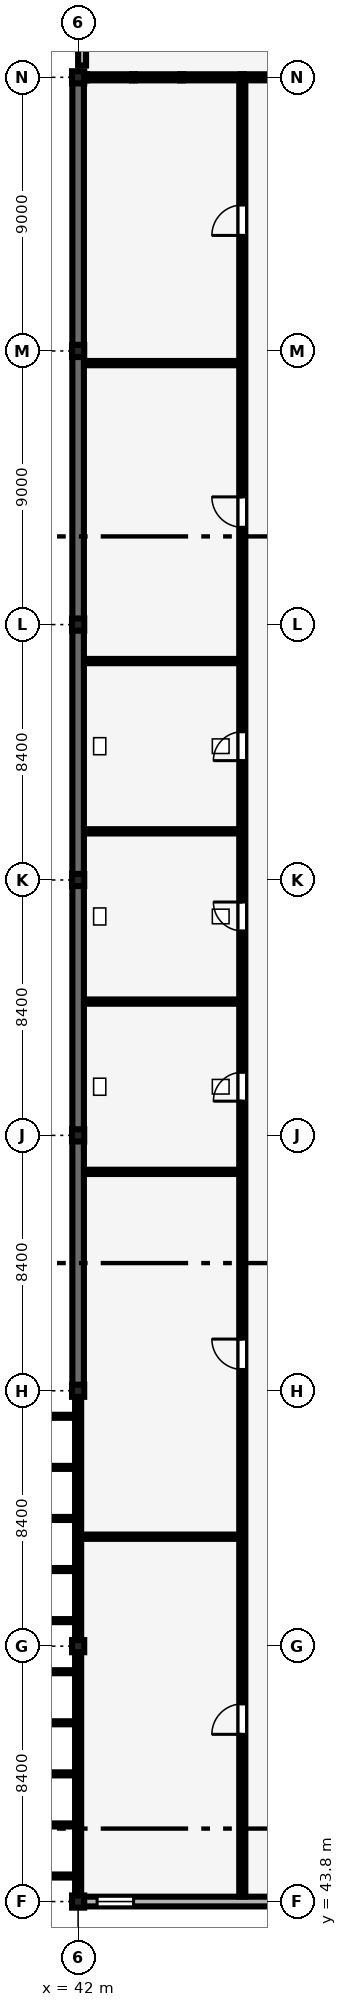
"""IFC4 building model, lengths in metres.
Left out: names, types, materials, properties, quantities, classifications, styles, units other than length and angle.
Written with IfcOpenShell. Run it as: python <this file> out.ifc"""

import sys

from ifc_helpers import new_model, si_unit, direction, frame, frame_2d, origin, origin_2d, place, context, subcontext, project, spatial, rectangle, extrude, element, fill, save


model = new_model("IFC4")
c1 = context("Model", 3, precision=1e-05, world=origin(), true_north=direction((0.0, 1.0)))
c2 = subcontext(c1, "Body", "Model", "MODEL_VIEW")
j1 = project(units=[si_unit("LENGTHUNIT", "METRE"), si_unit("PLANEANGLEUNIT", "RADIAN")], contexts=[c1])
p1 = place(None, origin())
s1 = spatial("IfcSite", under=j1, at=p1, CompositionType="ELEMENT")
p2 = place(p1, origin())
s2 = spatial("IfcBuilding", under=s1, at=p2, CompositionType="ELEMENT")
p3 = place(p2, frame((0.0, 0.0, 21.6)))
s3 = spatial("IfcBuildingStorey", under=s2, at=p3, CompositionType="ELEMENT", Elevation=21.6)
for number, where, z_axis, x_axis in (
    (1, (42.0, 43.8, 0.0), (0.0, 0.0, 1.0), (1.0, 0.0, 0.0)),
    (2, (42.0, 52.2, 0.0), (0.0, 0.0, 1.0), (1.0, 0.0, 0.0)),
    (3, (42.0, 60.6, 0.0), (0.0, 0.0, 1.0), (1.0, 0.0, 0.0)),
    (4, (42.0, 69.0, 0.0), (0.0, 0.0, 1.0), (1.0, 0.0, 0.0)),
    (5, (42.0, 77.4, 0.0), (0.0, 0.0, 1.0), (1.0, 0.0, 0.0)),
    (6, (42.0, 85.8, 0.0), (0.0, 0.0, 1.0), (1.0, 0.0, 0.0)),
    (7, (42.0, 94.8, 0.0), (0.0, 0.0, 1.0), (1.0, 0.0, 0.0)),
    (8, (42.0, 103.8, 0.0), (0.0, 0.0, 1.0), (1.0, 0.0, 0.0)),
):
    element("IfcColumn", number, at=place(p3, frame(where, z_axis=z_axis, x_axis=x_axis)), inside=s3, PredefinedType="COLUMN", context=c2, shape_type="SweptSolid", body=[
        extrude(rectangle(XDim=0.4, YDim=0.4, at=origin_2d()), origin(), (0.0, 0.0, 1.0), 4.2),
    ])
p4 = place(p3, frame((42.175, 43.8, 0.0), z_axis=(0.0, 0.0, 1.0), x_axis=(1.0, 0.0, 0.0)))
e9 = element("IfcWall", 9, at=p4, inside=s3, PredefinedType="SOLIDWALL", context=c2, shape_type="SweptSolid", body=[
    extrude(rectangle(XDim=8.05, YDim=0.32, at=frame_2d((4.025, 0.0))), origin(), (0.0, 0.0, 1.0), 3.48),
])
p5 = place(p4, frame((0.45, 0.0, 0.9)))
e10 = element("IfcOpeningElement", 10, at=p5, cuts=e9, PredefinedType="OPENING", context=c2, shape_type="SweptSolid", body=[
    extrude(rectangle(XDim=1.2, YDim=1.5, at=frame_2d((0.6, 0.75))), frame((0.0, 0.17, 0.0), z_axis=(0.0, -1.0, 0.0), x_axis=(1.0, 0.0, 0.0)), (0.0, 0.0, 1.0), 0.34),
])
p6 = place(p4, frame((6.4, 0.0, 0.9)))
e11 = element("IfcOpeningElement", 11, at=p6, cuts=e9, PredefinedType="OPENING", context=c2, shape_type="SweptSolid", body=[
    extrude(rectangle(XDim=1.2, YDim=1.8, at=frame_2d((0.6, 0.9))), frame((0.0, 0.17, 0.0), z_axis=(0.0, -1.0, 0.0), x_axis=(1.0, 0.0, 0.0)), (0.0, 0.0, 1.0), 0.34),
])
p7 = place(p3, frame((42.0, 60.775, 0.0), z_axis=(0.0, 0.0, 1.0), x_axis=(0.0, 1.0, 0.0)))
e12 = element("IfcWall", 12, at=p7, inside=s3, PredefinedType="SHEAR", context=c2, shape_type="SweptSolid", body=[
    extrude(rectangle(XDim=8.05, YDim=0.38, at=frame_2d((4.025, 0.0))), origin(), (0.0, 0.0, 1.0), 3.48),
])
p8 = place(p3, frame((42.0, 69.175, 0.0), z_axis=(0.0, 0.0, 1.0), x_axis=(0.0, 1.0, 0.0)))
e13 = element("IfcWall", 13, at=p8, inside=s3, PredefinedType="SHEAR", context=c2, shape_type="SweptSolid", body=[
    extrude(rectangle(XDim=8.05, YDim=0.38, at=frame_2d((4.025, 0.0))), origin(), (0.0, 0.0, 1.0), 3.43),
])
p9 = place(p3, frame((42.0, 77.575, 0.0), z_axis=(0.0, 0.0, 1.0), x_axis=(0.0, 1.0, 0.0)))
e14 = element("IfcWall", 14, at=p9, inside=s3, PredefinedType="SHEAR", context=c2, shape_type="SweptSolid", body=[
    extrude(rectangle(XDim=8.05, YDim=0.38, at=frame_2d((4.025, 0.0))), origin(), (0.0, 0.0, 1.0), 3.48),
])
p10 = place(p3, frame((42.0, 85.975, 0.0), z_axis=(0.0, 0.0, 1.0), x_axis=(0.0, 1.0, 0.0)))
e15 = element("IfcWall", 15, at=p10, inside=s3, PredefinedType="SHEAR", context=c2, shape_type="SweptSolid", body=[
    extrude(rectangle(XDim=8.65, YDim=0.38, at=frame_2d((4.325, 0.0))), origin(), (0.0, 0.0, 1.0), 3.43),
])
p11 = place(p3, frame((42.0, 94.975, 0.0), z_axis=(0.0, 0.0, 1.0), x_axis=(0.0, 1.0, 0.0)))
e16 = element("IfcWall", 16, at=p11, inside=s3, PredefinedType="SHEAR", context=c2, shape_type="SweptSolid", body=[
    extrude(rectangle(XDim=8.65, YDim=0.38, at=frame_2d((4.325, 0.0))), origin(), (0.0, 0.0, 1.0), 3.48),
])
p12 = place(p3, frame((42.13, 104.19, 0.0), z_axis=(0.0, 0.0, 1.0), x_axis=(0.0, 1.0, 0.0)))
e17 = element("IfcWall", 17, at=p12, inside=s3, PredefinedType="PARAPET", context=c2, shape_type="SweptSolid", body=[
    extrude(rectangle(XDim=8.22, YDim=0.26, at=frame_2d((4.11, 0.0))), origin(), (0.0, 0.0, 1.0), 0.85),
])
p13 = place(p3, frame((42.105, 55.8, 0.0), z_axis=(0.0, 0.0, 1.0), x_axis=(1.0, 0.0, 0.0)))
e18 = element("IfcWall", 18, at=p13, inside=s3, PredefinedType="PARTITIONING", context=c2, shape_type="SweptSolid", body=[
    extrude(rectangle(XDim=5.19, YDim=0.14, at=frame_2d((2.595, 0.0))), origin(), (0.0, 0.0, 1.0), 3.9),
])
for number, where, z_axis, x_axis in (
    (19, (42.195, 67.8, 0.0), (0.0, 0.0, 1.0), (1.0, 0.0, 0.0)),
    (20, (42.195, 73.4, 0.0), (0.0, 0.0, 1.0), (1.0, 0.0, 0.0)),
    (21, (42.195, 79.0, 0.0), (0.0, 0.0, 1.0), (1.0, 0.0, 0.0)),
    (22, (42.195, 84.6, 0.0), (0.0, 0.0, 1.0), (1.0, 0.0, 0.0)),
):
    element("IfcWall", number, at=place(p3, frame(where, z_axis=z_axis, x_axis=x_axis)), inside=s3, PredefinedType="PARTITIONING", context=c2, shape_type="SweptSolid", body=[
        extrude(rectangle(XDim=5.1, YDim=0.14, at=frame_2d((2.55, 0.0))), origin(), (0.0, 0.0, 1.0), 3.9),
    ])
p14 = place(p3, frame((42.195, 94.4, 0.0), z_axis=(0.0, 0.0, 1.0), x_axis=(1.0, 0.0, 0.0)))
e23 = element("IfcWall", 23, at=p14, inside=s3, PredefinedType="PARTITIONING", context=c2, shape_type="SweptSolid", body=[
    extrude(rectangle(XDim=5.1, YDim=0.14, at=frame_2d((2.55, 0.0))), origin(), (0.0, 0.0, 1.0), 3.43),
])
p15 = place(p3, frame((47.4, 43.965, 0.0), z_axis=(0.0, 0.0, 1.0), x_axis=(0.0, 1.0, 0.0)))
e24 = element("IfcWall", 24, at=p15, inside=s3, PredefinedType="PARTITIONING", context=c2, shape_type="SweptSolid", body=[
    extrude(rectangle(XDim=59.73, YDim=0.2, at=frame_2d((29.865, 0.0))), origin(), (0.0, 0.0, 1.0), 3.9),
])
p16 = place(p15, frame((5.335, 0.0, 0.0)))
e25 = element("IfcOpeningElement", 25, at=p16, cuts=e24, PredefinedType="OPENING", context=c2, shape_type="SweptSolid", body=[
    extrude(rectangle(XDim=1.0, YDim=2.15, at=frame_2d((0.5, 1.075))), frame((0.0, 0.11, 0.0), z_axis=(0.0, -1.0, 0.0), x_axis=(1.0, 0.0, 0.0)), (0.0, 0.0, 1.0), 0.22),
])
p17 = place(p15, frame((17.335, 0.0, 0.0)))
e26 = element("IfcOpeningElement", 26, at=p17, cuts=e24, PredefinedType="OPENING", context=c2, shape_type="SweptSolid", body=[
    extrude(rectangle(XDim=1.0, YDim=2.15, at=frame_2d((0.5, 1.075))), frame((0.0, 0.11, 0.0), z_axis=(0.0, -1.0, 0.0), x_axis=(1.0, 0.0, 0.0)), (0.0, 0.0, 1.0), 0.22),
])
p18 = place(p15, frame((26.16, 0.0, 0.0)))
e27 = element("IfcOpeningElement", 27, at=p18, cuts=e24, PredefinedType="OPENING", context=c2, shape_type="SweptSolid", body=[
    extrude(rectangle(XDim=0.95, YDim=2.2, at=frame_2d((0.475, 1.1))), frame((0.0, 0.11, 0.0), z_axis=(0.0, -1.0, 0.0), x_axis=(1.0, 0.0, 0.0)), (0.0, 0.0, 1.0), 0.22),
])
p19 = place(p15, frame((31.76, 0.0, 0.0)))
e28 = element("IfcOpeningElement", 28, at=p19, cuts=e24, PredefinedType="OPENING", context=c2, shape_type="SweptSolid", body=[
    extrude(rectangle(XDim=0.95, YDim=2.2, at=frame_2d((0.475, 1.1))), frame((0.0, 0.11, 0.0), z_axis=(0.0, -1.0, 0.0), x_axis=(1.0, 0.0, 0.0)), (0.0, 0.0, 1.0), 0.22),
])
p20 = place(p15, frame((37.36, 0.0, 0.0)))
e29 = element("IfcOpeningElement", 29, at=p20, cuts=e24, PredefinedType="OPENING", context=c2, shape_type="SweptSolid", body=[
    extrude(rectangle(XDim=0.95, YDim=2.1, at=frame_2d((0.475, 1.05))), frame((0.0, 0.11, 0.0), z_axis=(0.0, -1.0, 0.0), x_axis=(1.0, 0.0, 0.0)), (0.0, 0.0, 1.0), 0.22),
])
p21 = place(p15, frame((45.035, 0.0, 0.0)))
e30 = element("IfcOpeningElement", 30, at=p21, cuts=e24, PredefinedType="OPENING", context=c2, shape_type="SweptSolid", body=[
    extrude(rectangle(XDim=1.0, YDim=2.15, at=frame_2d((0.5, 1.075))), frame((0.0, 0.11, 0.0), z_axis=(0.0, -1.0, 0.0), x_axis=(1.0, 0.0, 0.0)), (0.0, 0.0, 1.0), 0.22),
])
p22 = place(p15, frame((54.635, 0.0, 0.0)))
e31 = element("IfcOpeningElement", 31, at=p22, cuts=e24, PredefinedType="OPENING", context=c2, shape_type="SweptSolid", body=[
    extrude(rectangle(XDim=1.0, YDim=2.15, at=frame_2d((0.5, 1.075))), frame((0.0, 0.11, 0.0), z_axis=(0.0, -1.0, 0.0), x_axis=(1.0, 0.0, 0.0)), (0.0, 0.0, 1.0), 0.22),
])
p23 = place(p5, origin())
e32 = element("IfcWindow", 32, at=p23, inside=s3, PartitioningType="SINGLE_PANEL", PredefinedType="WINDOW", context=c2, shape_type="SweptSolid", body=[
    extrude(rectangle(XDim=1.2, YDim=1.5, at=frame_2d((0.6, 0.75))), frame((0.0, 0.03, 0.0), z_axis=(0.0, -1.0, 0.0), x_axis=(1.0, 0.0, 0.0)), (0.0, 0.0, 1.0), 0.06),
])
fill(e10, e32)
p24 = place(p16, origin())
e33 = element("IfcDoor", 33, at=p24, inside=s3, OperationType="SINGLE_SWING_LEFT", PredefinedType="DOOR", context=c2, shape_type="SweptSolid", body=[
    extrude(rectangle(XDim=1.0, YDim=2.15, at=frame_2d((0.5, 1.075))), frame((0.0, 0.025, 0.0), z_axis=(0.0, -1.0, 0.0), x_axis=(1.0, 0.0, 0.0)), (0.0, 0.0, 1.0), 0.05),
])
fill(e25, e33)
p25 = place(p17, origin())
e34 = element("IfcDoor", 34, at=p25, inside=s3, OperationType="SINGLE_SWING_RIGHT", PredefinedType="DOOR", context=c2, shape_type="SweptSolid", body=[
    extrude(rectangle(XDim=1.0, YDim=2.15, at=frame_2d((0.5, 1.075))), frame((0.0, 0.025, 0.0), z_axis=(0.0, -1.0, 0.0), x_axis=(1.0, 0.0, 0.0)), (0.0, 0.0, 1.0), 0.05),
])
fill(e26, e34)
p26 = place(p18, origin())
e35 = element("IfcDoor", 35, at=p26, inside=s3, OperationType="SINGLE_SWING_LEFT", PredefinedType="DOOR", context=c2, shape_type="SweptSolid", body=[
    extrude(rectangle(XDim=0.95, YDim=2.2, at=frame_2d((0.475, 1.1))), frame((0.0, 0.025, 0.0), z_axis=(0.0, -1.0, 0.0), x_axis=(1.0, 0.0, 0.0)), (0.0, 0.0, 1.0), 0.05),
])
fill(e27, e35)
p27 = place(p19, origin())
e36 = element("IfcDoor", 36, at=p27, inside=s3, OperationType="SINGLE_SWING_RIGHT", PredefinedType="DOOR", context=c2, shape_type="SweptSolid", body=[
    extrude(rectangle(XDim=0.95, YDim=2.2, at=frame_2d((0.475, 1.1))), frame((0.0, 0.025, 0.0), z_axis=(0.0, -1.0, 0.0), x_axis=(1.0, 0.0, 0.0)), (0.0, 0.0, 1.0), 0.05),
])
fill(e28, e36)
p28 = place(p20, origin())
e37 = element("IfcDoor", 37, at=p28, inside=s3, OperationType="SINGLE_SWING_LEFT", PredefinedType="DOOR", context=c2, shape_type="SweptSolid", body=[
    extrude(rectangle(XDim=0.95, YDim=2.1, at=frame_2d((0.475, 1.05))), frame((0.0, 0.025, 0.0), z_axis=(0.0, -1.0, 0.0), x_axis=(1.0, 0.0, 0.0)), (0.0, 0.0, 1.0), 0.05),
])
fill(e29, e37)
p29 = place(p21, origin())
e38 = element("IfcDoor", 38, at=p29, inside=s3, OperationType="SINGLE_SWING_RIGHT", PredefinedType="DOOR", context=c2, shape_type="SweptSolid", body=[
    extrude(rectangle(XDim=1.0, YDim=2.15, at=frame_2d((0.5, 1.075))), frame((0.0, 0.025, 0.0), z_axis=(0.0, -1.0, 0.0), x_axis=(1.0, 0.0, 0.0)), (0.0, 0.0, 1.0), 0.05),
])
fill(e30, e38)
p30 = place(p22, origin())
e39 = element("IfcDoor", 39, at=p30, inside=s3, OperationType="SINGLE_SWING_LEFT", PredefinedType="DOOR", context=c2, shape_type="SweptSolid", body=[
    extrude(rectangle(XDim=1.0, YDim=2.15, at=frame_2d((0.5, 1.075))), frame((0.0, 0.025, 0.0), z_axis=(0.0, -1.0, 0.0), x_axis=(1.0, 0.0, 0.0)), (0.0, 0.0, 1.0), 0.05),
])
fill(e31, e39)
save(model, sys.argv[1])
